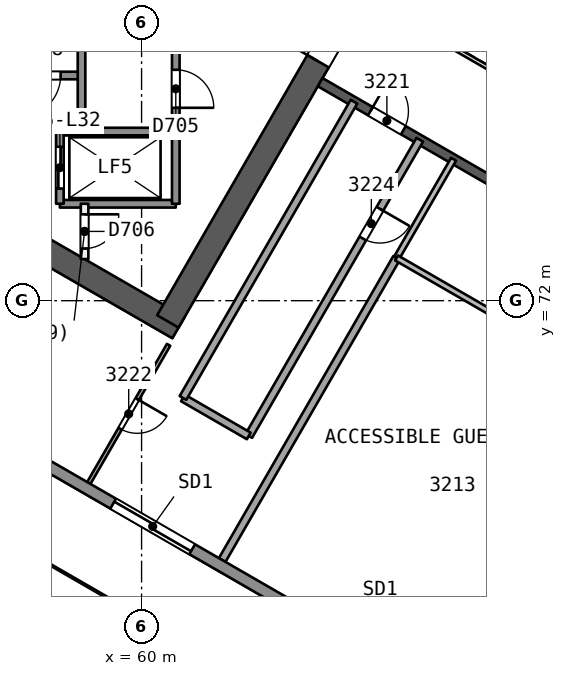
"""IFC4 building model, lengths in metres.
Left out: names, types, materials, properties, quantities, classifications, styles, units other than length and angle.
Written with IfcOpenShell. Run it as: python <this file> out.ifc"""

import sys

from ifc_helpers import new_model, si_unit, direction, frame, frame_2d, origin, place, context, subcontext, project, spatial, rectangle, extrude, element, fill, save


model = new_model("IFC4")
c1 = context("Model", 3, precision=1e-05, world=origin(), true_north=direction((0.0, 1.0)))
c2 = subcontext(c1, "Body", "Model", "MODEL_VIEW")
j1 = project(units=[si_unit("LENGTHUNIT", "METRE"), si_unit("PLANEANGLEUNIT", "RADIAN")], contexts=[c1])
p1 = place(None, origin())
s1 = spatial("IfcSite", under=j1, at=p1, CompositionType="ELEMENT")
p2 = place(p1, origin())
s2 = spatial("IfcBuilding", under=s1, at=p2, CompositionType="ELEMENT")
p3 = place(p2, frame((0.0, 0.0, 132.7)))
s3 = spatial("IfcBuildingStorey", under=s2, at=p3, CompositionType="ELEMENT", Elevation=132.7)
p4 = place(p3, frame((48.722, 78.365, 0.0), z_axis=(0.0, 0.0, 1.0), x_axis=(0.866020036431, -0.500009296414, 0.0)))
e1 = element("IfcWall", 1, at=p4, inside=s3, PredefinedType="SHEAR", context=c2, shape_type="SweptSolid", body=[
    extrude(rectangle(XDim=14.146, YDim=0.65, at=frame_2d((7.073, 0.0))), origin(), (0.0, 0.0, 1.0), 3.7),
])
p5 = place(p3, frame((60.691, 71.455, 0.0), z_axis=(0.0, 0.0, 1.0), x_axis=(0.499983075189, 0.866035175108, 0.0)))
e2 = element("IfcWall", 2, at=p5, inside=s3, PredefinedType="SHEAR", context=c2, shape_type="SweptSolid", body=[
    extrude(rectangle(XDim=10.055, YDim=0.65, at=frame_2d((5.027, 0.0))), origin(), (0.0, 0.0, 1.0), 3.7),
])
p6 = place(p5, frame((7.905, 0.0, 0.0)))
e3 = element("IfcOpeningElement", 3, at=p6, cuts=e2, PredefinedType="OPENING", context=c2, shape_type="SweptSolid", body=[
    extrude(rectangle(XDim=1.2, YDim=2.1, at=frame_2d((0.6, 1.05))), frame((0.0, 0.335, 0.0), z_axis=(0.0, -1.0, 0.0), x_axis=(1.0, 0.0, 0.0)), (0.0, 0.0, 1.0), 0.671),
])
p7 = place(p3, frame((64.7, 77.748, 0.0), z_axis=(0.0, 0.0, 1.0), x_axis=(0.866026492143, -0.499998114903, 0.0)))
e4 = element("IfcWall", 4, at=p7, inside=s3, PredefinedType="SHEAR", context=c2, shape_type="SweptSolid", body=[
    extrude(rectangle(XDim=15.588, YDim=0.25, at=frame_2d((7.794, 0.0))), origin(), (0.0, 0.0, 1.0), 3.25),
])
p8 = place(p7, frame((1.527, 0.0, 0.0)))
e5 = element("IfcOpeningElement", 5, at=p8, cuts=e4, PredefinedType="OPENING", context=c2, shape_type="SweptSolid", body=[
    extrude(rectangle(XDim=1.0, YDim=2.1, at=frame_2d((0.5, 1.05))), frame((0.0, 0.135, 0.0), z_axis=(0.0, -1.0, 0.0), x_axis=(1.0, 0.0, 0.0)), (0.0, 0.0, 1.0), 0.271),
])
p9 = place(p7, frame((8.538, 0.0, 0.0)))
e6 = element("IfcOpeningElement", 6, at=p9, cuts=e4, PredefinedType="OPENING", context=c2, shape_type="SweptSolid", body=[
    extrude(rectangle(XDim=1.1, YDim=2.1, at=frame_2d((0.55, 1.05))), frame((0.0, 0.135, 0.0), z_axis=(0.0, -1.0, 0.0), x_axis=(1.0, 0.0, 0.0)), (0.0, 0.0, 1.0), 0.271),
])
p10 = place(p7, frame((12.906, 0.0, 0.0)))
e7 = element("IfcOpeningElement", 7, at=p10, cuts=e4, PredefinedType="OPENING", context=c2, shape_type="SweptSolid", body=[
    extrude(rectangle(XDim=1.0, YDim=2.1, at=frame_2d((0.5, 1.05))), frame((0.0, 0.135, 0.0), z_axis=(0.0, -1.0, 0.0), x_axis=(1.0, 0.0, 0.0)), (0.0, 0.0, 1.0), 0.271),
])
p11 = place(p3, frame((60.71, 70.838, 0.0), z_axis=(0.0, 0.0, 1.0), x_axis=(-0.49999760543, -0.866026786286, 0.0)))
e8 = element("IfcWall", 8, at=p11, inside=s3, PredefinedType="PARTITIONING", context=c2, shape_type="SweptSolid", body=[
    extrude(rectangle(XDim=4.199, YDim=0.1, at=frame_2d((2.099, 0.0))), origin(), (0.0, 0.0, 1.0), 3.25),
])
p12 = place(p11, frame((1.649, 0.0, 0.0)))
e9 = element("IfcOpeningElement", 9, at=p12, cuts=e8, PredefinedType="OPENING", context=c2, shape_type="SweptSolid", body=[
    extrude(rectangle(XDim=0.9, YDim=2.1, at=frame_2d((0.45, 1.05))), frame((0.0, 0.061, 0.0), z_axis=(0.0, -1.0, 0.0), x_axis=(1.0, 0.0, 0.0)), (0.0, 0.0, 1.0), 0.121),
])
p13 = place(p3, frame((67.321, 76.235, 0.0), z_axis=(0.0, 0.0, 1.0), x_axis=(-0.5000018851, -0.866024315419, 0.0)))
e10 = element("IfcWall", 10, at=p13, inside=s3, PredefinedType="PARTITIONING", context=c2, shape_type="SweptSolid", body=[
    extrude(rectangle(XDim=9.0, YDim=0.2, at=frame_2d((4.5, 0.0))), origin(), (0.0, 0.0, 1.0), 3.25),
])
p14 = place(p13, frame((2.1, 0.0, 0.0)))
e11 = element("IfcOpeningElement", 11, at=p14, cuts=e10, PredefinedType="OPENING", context=c2, shape_type="SweptSolid", body=[
    extrude(rectangle(XDim=0.9, YDim=2.1, at=frame_2d((0.45, 1.05))), frame((0.0, 0.11, 0.0), z_axis=(0.0, -1.0, 0.0), x_axis=(1.0, 0.0, 0.0)), (0.0, 0.0, 1.0), 0.221),
])
p15 = place(p3, frame((62.821, 68.441, 0.0), z_axis=(0.0, 0.0, 1.0), x_axis=(-0.866041268327, 0.499972520799, 0.0)))
e12 = element("IfcWall", 12, at=p15, inside=s3, PredefinedType="PARTITIONING", context=c2, shape_type="SweptSolid", body=[
    extrude(rectangle(XDim=2.0, YDim=0.2, at=frame_2d((1.0, 0.0))), origin(), (0.0, 0.0, 1.0), 3.25),
])
p16 = place(p3, frame((61.089, 69.441, 0.0), z_axis=(0.0, 0.0, 1.0), x_axis=(0.5000018851, 0.866024315419, 0.0)))
e13 = element("IfcWall", 13, at=p16, inside=s3, PredefinedType="PARTITIONING", context=c2, shape_type="SweptSolid", body=[
    extrude(rectangle(XDim=9.0, YDim=0.2, at=frame_2d((4.5, 0.0))), origin(), (0.0, 0.0, 1.0), 3.25),
])
p17 = place(p3, frame((62.121, 65.176, 0.0), z_axis=(0.0, 0.0, 1.0), x_axis=(0.5000072221, 0.866021234063, 0.0)))
e14 = element("IfcWall", 14, at=p17, inside=s3, PredefinedType="PARTITIONING", context=c2, shape_type="SweptSolid", body=[
    extrude(rectangle(XDim=9.177, YDim=0.2, at=frame_2d((4.589, 0.0))), origin(), (0.0, 0.0, 1.0), 3.25),
])
p18 = place(p3, frame((66.71, 73.124, 0.0), z_axis=(0.0, 0.0, 1.0), x_axis=(0.499990139034, 0.866031096941, 0.0)))
e15 = element("IfcWall", 15, at=p18, inside=s3, PredefinedType="PARTITIONING", context=c2, shape_type="SweptSolid", body=[
    extrude(rectangle(XDim=3.0, YDim=0.15, at=frame_2d((1.5, 0.0))), origin(), (0.0, 0.0, 1.0), 3.25),
])
p19 = place(p3, frame((69.221, 71.674, 0.0), z_axis=(0.0, 0.0, 1.0), x_axis=(-0.866032775405, 0.499987231761, 0.0)))
e16 = element("IfcWall", 16, at=p19, inside=s3, PredefinedType="PARTITIONING", context=c2, shape_type="SweptSolid", body=[
    extrude(rectangle(XDim=2.9, YDim=0.15, at=frame_2d((1.45, 0.0))), origin(), (0.0, 0.0, 1.0), 3.25),
])
p20 = place(p3, frame((68.331, 61.59, 0.0), z_axis=(0.0, 0.0, 1.0), x_axis=(0.499987977232, 0.866032345022, 0.0)))
e17 = element("IfcWall", 17, at=p20, inside=s3, PredefinedType="PARTITIONING", context=c2, shape_type="SweptSolid", body=[
    extrude(rectangle(XDim=12.177, YDim=0.2, at=frame_2d((6.089, 0.0))), origin(), (0.0, 0.0, 1.0), 3.25),
])
p21 = place(p3, frame((89.477, 49.21, 0.0), z_axis=(0.0, 0.0, 1.0), x_axis=(-0.866026276916, 0.499998487688, 0.0)))
e18 = element("IfcWall", 18, at=p21, inside=s3, PredefinedType="SOLIDWALL", context=c2, shape_type="SweptSolid", body=[
    extrude(rectangle(XDim=55.864, YDim=0.3, at=frame_2d((27.932, 0.0))), origin(), (0.0, 0.0, 1.0), 3.25),
])
p22 = place(p21, frame((26.888, 0.0, 0.0)))
e19 = element("IfcOpeningElement", 19, at=p22, cuts=e18, PredefinedType="OPENING", context=c2, shape_type="SweptSolid", body=[
    extrude(rectangle(XDim=2.4, YDim=2.4, at=frame_2d((1.2, 1.2))), frame((0.0, 0.161, 0.0), z_axis=(0.0, -1.0, 0.0), x_axis=(1.0, 0.0, 0.0)), (0.0, 0.0, 1.0), 0.321),
])
p23 = place(p21, frame((32.5, 0.0, 0.0)))
e20 = element("IfcOpeningElement", 20, at=p23, cuts=e18, PredefinedType="OPENING", context=c2, shape_type="SweptSolid", body=[
    extrude(rectangle(XDim=2.4, YDim=2.4, at=frame_2d((1.2, 1.2))), frame((0.0, 0.161, 0.0), z_axis=(0.0, -1.0, 0.0), x_axis=(1.0, 0.0, 0.0)), (0.0, 0.0, 1.0), 0.321),
])
p24 = place(p21, frame((43.384, 0.0, 0.0)))
e21 = element("IfcOpeningElement", 21, at=p24, cuts=e18, PredefinedType="OPENING", context=c2, shape_type="SweptSolid", body=[
    extrude(rectangle(XDim=2.4, YDim=2.4, at=frame_2d((1.2, 1.2))), frame((0.0, 0.161, 0.0), z_axis=(0.0, -1.0, 0.0), x_axis=(1.0, 0.0, 0.0)), (0.0, 0.0, 1.0), 0.321),
])
p25 = place(p21, frame((21.12, 0.0, 0.0)))
e22 = element("IfcOpeningElement", 22, at=p25, cuts=e18, PredefinedType="OPENING", context=c2, shape_type="SweptSolid", body=[
    extrude(rectangle(XDim=2.4, YDim=2.4, at=frame_2d((1.2, 1.2))), frame((0.0, 0.161, 0.0), z_axis=(0.0, -1.0, 0.0), x_axis=(1.0, 0.0, 0.0)), (0.0, 0.0, 1.0), 0.321),
])
p26 = place(p21, frame((10.029, 0.0, 0.0)))
e23 = element("IfcOpeningElement", 23, at=p26, cuts=e18, PredefinedType="OPENING", context=c2, shape_type="SweptSolid", body=[
    extrude(rectangle(XDim=2.4, YDim=2.4, at=frame_2d((1.2, 1.2))), frame((0.0, 0.161, 0.0), z_axis=(0.0, -1.0, 0.0), x_axis=(1.0, 0.0, 0.0)), (0.0, 0.0, 1.0), 0.321),
])
p27 = place(p3, frame((58.42, 77.925, 0.0), z_axis=(0.0, 0.0, 1.0), x_axis=(-1.0, 0.0, 0.0)))
e24 = element("IfcWall", 24, at=p27, inside=s3, PredefinedType="SOLIDWALL", context=c2, shape_type="SweptSolid", body=[
    extrude(rectangle(XDim=7.7, YDim=0.2, at=frame_2d((3.85, 0.0))), origin(), (0.0, 0.0, 1.0), 3.25),
])
p28 = place(p27, frame((0.55, 0.0, 0.0)))
e25 = element("IfcOpeningElement", 25, at=p28, cuts=e24, PredefinedType="OPENING", context=c2, shape_type="SweptSolid", body=[
    extrude(rectangle(XDim=1.1, YDim=2.1, at=frame_2d((0.55, 1.05))), frame((0.0, 0.11, 0.0), z_axis=(0.0, -1.0, 0.0), x_axis=(1.0, 0.0, 0.0)), (0.0, 0.0, 1.0), 0.221),
])
for number, where, z_axis, x_axis in (
    (26, (60.9, 76.45, 0.0), (0.0, 0.0, 1.0), (-1.0, 0.0, 0.0)),
    (27, (60.9, 74.55, 0.0), (0.0, 0.0, 1.0), (-1.0, 0.0, 0.0)),
):
    element("IfcWall", number, at=place(p3, frame(where, z_axis=z_axis, x_axis=x_axis)), inside=s3, PredefinedType="SOLIDWALL", context=c2, shape_type="SweptSolid", body=[
        extrude(rectangle(XDim=3.05, YDim=0.2, at=frame_2d((1.525, 0.0))), origin(), (0.0, 0.0, 1.0), 3.25),
    ])
p29 = place(p3, frame((60.9, 85.45, 0.0), z_axis=(0.0, 0.0, 1.0), x_axis=(0.0, -1.0, 0.0)))
e28 = element("IfcWall", 28, at=p29, inside=s3, PredefinedType="SOLIDWALL", context=c2, shape_type="SweptSolid", body=[
    extrude(rectangle(XDim=10.9, YDim=0.2, at=frame_2d((5.45, 0.0))), origin(), (0.0, 0.0, 1.0), 3.25),
])
p30 = place(p29, frame((1.75, 0.0, 0.0)))
e29 = element("IfcOpeningElement", 29, at=p30, cuts=e28, PredefinedType="OPENING", context=c2, shape_type="SweptSolid", body=[
    extrude(rectangle(XDim=1.0, YDim=2.1, at=frame_2d((0.5, 1.05))), frame((0.0, 0.11, 0.0), z_axis=(0.0, -1.0, 0.0), x_axis=(1.0, 0.0, 0.0)), (0.0, 0.0, 1.0), 0.221),
])
p31 = place(p29, frame((5.125, 0.0, 0.0)))
e30 = element("IfcOpeningElement", 30, at=p31, cuts=e28, PredefinedType="OPENING", context=c2, shape_type="SweptSolid", body=[
    extrude(rectangle(XDim=1.0, YDim=2.1, at=frame_2d((0.5, 1.05))), frame((0.0, 0.11, 0.0), z_axis=(0.0, -1.0, 0.0), x_axis=(1.0, 0.0, 0.0)), (0.0, 0.0, 1.0), 0.221),
])
p32 = place(p29, frame((7.375, 0.0, 0.0)))
e31 = element("IfcOpeningElement", 31, at=p32, cuts=e28, PredefinedType="OPENING", context=c2, shape_type="SweptSolid", body=[
    extrude(rectangle(XDim=1.0, YDim=2.1, at=frame_2d((0.5, 1.05))), frame((0.0, 0.11, 0.0), z_axis=(0.0, -1.0, 0.0), x_axis=(1.0, 0.0, 0.0)), (0.0, 0.0, 1.0), 0.221),
])
p33 = place(p3, frame((58.5, 74.55, 0.0), z_axis=(0.0, 0.0, 1.0), x_axis=(0.0, -1.0, 0.0)))
e32 = element("IfcWall", 32, at=p33, inside=s3, PredefinedType="PARTITIONING", context=c2, shape_type="SweptSolid", body=[
    extrude(rectangle(XDim=1.455, YDim=0.2, at=frame_2d((0.728, 0.0))), origin(), (0.0, 0.0, 1.0), 3.25),
])
p34 = place(p33, frame((0.278, 0.0, 0.0)))
e33 = element("IfcOpeningElement", 33, at=p34, cuts=e32, PredefinedType="OPENING", context=c2, shape_type="SweptSolid", body=[
    extrude(rectangle(XDim=0.9, YDim=2.1, at=frame_2d((0.45, 1.05))), frame((0.0, 0.11, 0.0), z_axis=(0.0, -1.0, 0.0), x_axis=(1.0, 0.0, 0.0)), (0.0, 0.0, 1.0), 0.221),
])
p35 = place(p3, frame((58.42, 85.45, 0.0), z_axis=(0.0, 0.0, 1.0), x_axis=(0.0, -1.0, 0.0)))
e34 = element("IfcWall", 34, at=p35, inside=s3, PredefinedType="SOLIDWALL", context=c2, shape_type="SweptSolid", body=[
    extrude(rectangle(XDim=9.0, YDim=0.2, at=frame_2d((4.5, 0.0))), origin(), (0.0, 0.0, 1.0), 3.25),
])
p36 = place(p3, frame((57.85, 76.45, 0.0), z_axis=(0.0, 0.0, 1.0), x_axis=(0.0, -1.0, 0.0)))
e35 = element("IfcWall", 35, at=p36, inside=s3, PredefinedType="SOLIDWALL", context=c2, shape_type="SweptSolid", body=[
    extrude(rectangle(XDim=1.9, YDim=0.2, at=frame_2d((0.95, 0.0))), origin(), (0.0, 0.0, 1.0), 3.25),
])
p37 = place(p36, frame((0.4, 0.0, 0.0)))
e36 = element("IfcOpeningElement", 36, at=p37, cuts=e35, PredefinedType="OPENING", context=c2, shape_type="SweptSolid", body=[
    extrude(rectangle(XDim=1.1, YDim=2.1, at=frame_2d((0.55, 1.05))), frame((0.0, 0.11, 0.0), z_axis=(0.0, -1.0, 0.0), x_axis=(1.0, 0.0, 0.0)), (0.0, 0.0, 1.0), 0.221),
])
p38 = place(p3, frame((67.702, 78.948, 0.0), z_axis=(0.0, 0.0, 1.0), x_axis=(0.866026658274, -0.499997827154, 0.0)))
e37 = element("IfcWall", 37, at=p38, inside=s3, PredefinedType="PARTITIONING", context=c2, shape_type="SweptSolid", body=[
    extrude(rectangle(XDim=11.588, YDim=0.1, at=frame_2d((5.794, 0.0))), origin(), (0.0, 0.0, 1.0), 3.25),
])
p39 = place(p8, origin())
e38 = element("IfcDoor", 38, at=p39, inside=s3, OperationType="SINGLE_SWING_LEFT", PredefinedType="NOTDEFINED", context=c2, shape_type="SweptSolid", body=[
    extrude(rectangle(XDim=1.0, YDim=2.1, at=frame_2d((0.5, 1.05))), frame((0.0, 0.025, 0.0), z_axis=(0.0, -1.0, 0.0), x_axis=(1.0, 0.0, 0.0)), (0.0, 0.0, 1.0), 0.05),
])
fill(e5, e38)
p40 = place(p12, origin())
e39 = element("IfcDoor", 39, at=p40, inside=s3, OperationType="SINGLE_SWING_LEFT", PredefinedType="NOTDEFINED", context=c2, shape_type="SweptSolid", body=[
    extrude(rectangle(XDim=0.9, YDim=2.1, at=frame_2d((0.45, 1.05))), frame((0.0, 0.025, 0.0), z_axis=(0.0, -1.0, 0.0), x_axis=(1.0, 0.0, 0.0)), (0.0, 0.0, 1.0), 0.05),
])
fill(e9, e39)
p41 = place(p14, origin())
e40 = element("IfcDoor", 40, at=p41, inside=s3, OperationType="SINGLE_SWING_LEFT", PredefinedType="NOTDEFINED", context=c2, shape_type="SweptSolid", body=[
    extrude(rectangle(XDim=0.9, YDim=2.1, at=frame_2d((0.45, 1.05))), frame((0.0, 0.025, 0.0), z_axis=(0.0, -1.0, 0.0), x_axis=(1.0, 0.0, 0.0)), (0.0, 0.0, 1.0), 0.05),
])
fill(e11, e40)
p42 = place(p23, origin())
e41 = element("IfcDoor", 41, at=p42, inside=s3, OperationType="SLIDING_TO_RIGHT", PredefinedType="NOTDEFINED", context=c2, shape_type="SweptSolid", body=[
    extrude(rectangle(XDim=2.4, YDim=2.4, at=frame_2d((1.2, 1.2))), frame((0.0, 0.025, 0.0), z_axis=(0.0, -1.0, 0.0), x_axis=(1.0, 0.0, 0.0)), (0.0, 0.0, 1.0), 0.05),
])
fill(e20, e41)
p43 = place(p6, origin())
e42 = element("IfcDoor", 42, at=p43, inside=s3, OperationType="SINGLE_SWING_LEFT", PredefinedType="NOTDEFINED", context=c2, shape_type="SweptSolid", body=[
    extrude(rectangle(XDim=1.2, YDim=2.1, at=frame_2d((0.6, 1.05))), frame((0.0, 0.025, 0.0), z_axis=(0.0, -1.0, 0.0), x_axis=(1.0, 0.0, 0.0)), (0.0, 0.0, 1.0), 0.05),
])
fill(e3, e42)
p44 = place(p37, origin())
e43 = element("IfcDoor", 43, at=p44, inside=s3, OperationType="SLIDING_TO_RIGHT", PredefinedType="NOTDEFINED", context=c2, shape_type="SweptSolid", body=[
    extrude(rectangle(XDim=1.1, YDim=2.1, at=frame_2d((0.55, 1.05))), frame((0.0, 0.025, 0.0), z_axis=(0.0, -1.0, 0.0), x_axis=(1.0, 0.0, 0.0)), (0.0, 0.0, 1.0), 0.05),
])
fill(e36, e43)
p45 = place(p32, origin())
e44 = element("IfcDoor", 44, at=p45, inside=s3, OperationType="SINGLE_SWING_RIGHT", PredefinedType="NOTDEFINED", context=c2, shape_type="SweptSolid", body=[
    extrude(rectangle(XDim=1.0, YDim=2.1, at=frame_2d((0.5, 1.05))), frame((0.0, 0.025, 0.0), z_axis=(0.0, -1.0, 0.0), x_axis=(1.0, 0.0, 0.0)), (0.0, 0.0, 1.0), 0.05),
])
fill(e31, e44)
p46 = place(p34, origin())
e45 = element("IfcDoor", 45, at=p46, inside=s3, OperationType="SINGLE_SWING_LEFT", PredefinedType="NOTDEFINED", context=c2, shape_type="SweptSolid", body=[
    extrude(rectangle(XDim=0.9, YDim=2.1, at=frame_2d((0.45, 1.05))), frame((0.0, 0.025, 0.0), z_axis=(0.0, -1.0, 0.0), x_axis=(1.0, 0.0, 0.0)), (0.0, 0.0, 1.0), 0.05),
])
fill(e33, e45)
p47 = place(p28, origin())
e46 = element("IfcDoor", 46, at=p47, inside=s3, OperationType="SINGLE_SWING_RIGHT", PredefinedType="NOTDEFINED", context=c2, shape_type="SweptSolid", body=[
    extrude(rectangle(XDim=1.1, YDim=2.1, at=frame_2d((0.55, 1.05))), frame((0.0, 0.025, 0.0), z_axis=(0.0, -1.0, 0.0), x_axis=(1.0, 0.0, 0.0)), (0.0, 0.0, 1.0), 0.05),
])
fill(e25, e46)
save(model, sys.argv[1])
